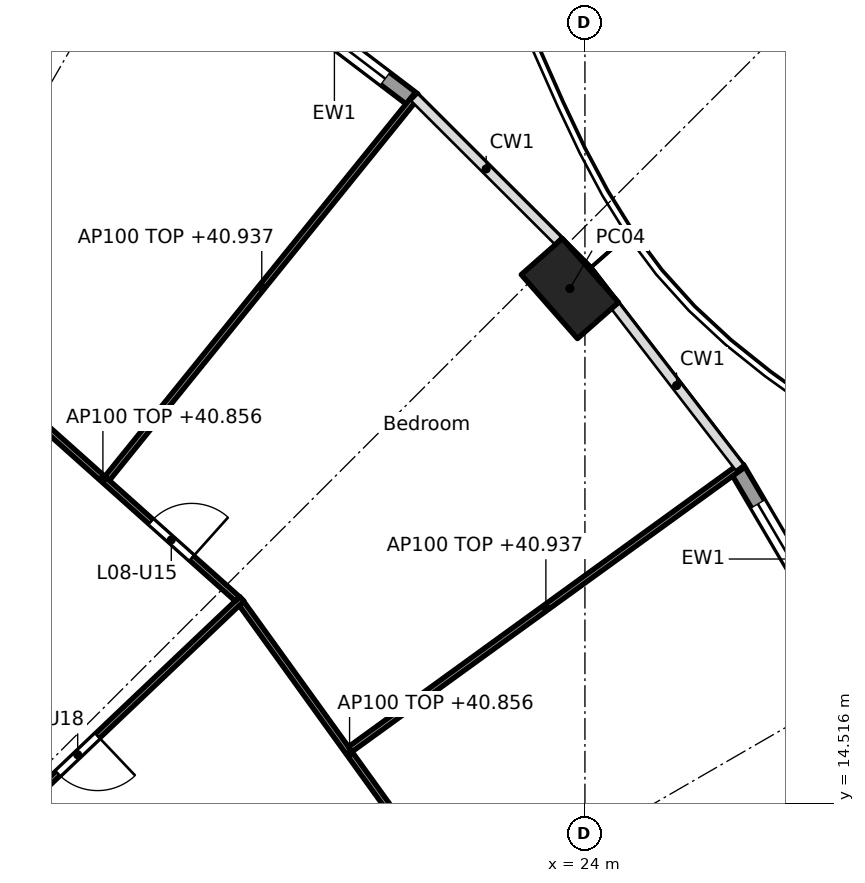
"""IFC4 building model, lengths in metres.
Left out: names, types, materials, properties, quantities, classifications, styles, units other than length and angle.
Written with IfcOpenShell. Run it as: python <this file> out.ifc"""

import sys

from ifc_helpers import new_model, si_unit, direction, frame, frame_2d, origin, origin_2d, place, context, subcontext, project, spatial, rectangle, hollow_rectangle, extrude, element, fill, save


model = new_model("IFC4")
c1 = context("Model", 3, precision=1e-05, world=origin(), true_north=direction((0.0, 1.0)))
c2 = subcontext(c1, "Body", "Model", "MODEL_VIEW")
j1 = project(units=[si_unit("LENGTHUNIT", "METRE"), si_unit("PLANEANGLEUNIT", "RADIAN")], contexts=[c1])
p1 = place(None, origin())
s1 = spatial("IfcSite", under=j1, at=p1, CompositionType="ELEMENT")
p2 = place(p1, origin())
s2 = spatial("IfcBuilding", under=s1, at=p2, CompositionType="ELEMENT")
p3 = place(p2, frame((0.0, 0.0, 38.1)))
s3 = spatial("IfcBuildingStorey", under=s2, at=p3, CompositionType="ELEMENT", Elevation=38.1)
p4 = place(p3, frame((23.752, 22.981, 0.0), z_axis=(0.0, 0.0, 1.0), x_axis=(-0.660114607735, 0.751164898445, 0.0)))
e1 = element("IfcColumn", 1, at=p4, inside=s3, PredefinedType="COLUMN", context=c2, shape_type="SweptSolid", body=[
    extrude(hollow_rectangle(XDim=1.4, YDim=0.9, WallThickness=0.05, at=origin_2d()), origin(), (0.0, 0.0, 1.0), 3.7),
])
p5 = place(p3, frame((26.5, 20.026, 0.0), z_axis=(0.0, 0.0, 1.0), x_axis=(0.506311160839, -0.862350861546, 0.0)))
e2 = element("IfcWall", 2, at=p5, inside=s3, PredefinedType="SOLIDWALL", context=c2, shape_type="SweptSolid", body=[
    extrude(rectangle(XDim=3.462, YDim=0.25, at=frame_2d((1.731, 0.0))), origin(), (0.0, 0.0, 1.0), 3.44),
])
p6 = place(p5, frame((0.681, 0.0, 0.0)))
e3 = element("IfcOpeningElement", 3, at=p6, cuts=e2, PredefinedType="OPENING", context=c2, shape_type="SweptSolid", body=[
    extrude(rectangle(XDim=2.1, YDim=2.4, at=frame_2d((1.05, 1.2))), frame((0.0, 0.135, 0.0), z_axis=(0.0, -1.0, 0.0), x_axis=(1.0, 0.0, 0.0)), (0.0, 0.0, 1.0), 0.27),
])
p7 = place(p3, frame((18.582, 28.056, 0.0), z_axis=(0.0, 0.0, 1.0), x_axis=(0.796022293214, -0.605267303517, 0.0)))
e4 = element("IfcWall", 4, at=p7, inside=s3, PredefinedType="SOLIDWALL", context=c2, shape_type="SweptSolid", body=[
    extrude(rectangle(XDim=3.262, YDim=0.25, at=frame_2d((1.631, 0.0))), origin(), (0.0, 0.0, 1.0), 3.44),
])
p8 = place(p7, frame((0.581, 0.0, 0.0)))
e5 = element("IfcOpeningElement", 5, at=p8, cuts=e4, PredefinedType="OPENING", context=c2, shape_type="SweptSolid", body=[
    extrude(rectangle(XDim=2.1, YDim=2.4, at=frame_2d((1.05, 1.2))), frame((0.0, 0.135, 0.0), z_axis=(0.0, -1.0, 0.0), x_axis=(1.0, 0.0, 0.0)), (0.0, 0.0, 1.0), 0.27),
])
p9 = place(p3, frame((21.908, 12.866, 0.0), z_axis=(0.0, 0.0, 1.0), x_axis=(-0.584558392935, 0.811351640936, 0.0)))
e6 = element("IfcWall", 6, at=p9, inside=s3, PredefinedType="PARTITIONING", context=c2, shape_type="SweptSolid", body=[
    extrude(rectangle(XDim=6.084, YDim=0.1, at=frame_2d((3.042, 0.0))), origin(), (0.0, 0.0, 1.0), 2.756),
])
p10 = place(p3, frame((20.141, 15.405, 0.0), z_axis=(0.0, 0.0, 1.0), x_axis=(0.809834895779, 0.58665785734, 0.0)))
e7 = element("IfcWall", 7, at=p10, inside=s3, PredefinedType="PARTITIONING", context=c2, shape_type="SweptSolid", body=[
    extrude(rectangle(XDim=7.945, YDim=0.1, at=frame_2d((3.973, 0.0))), origin(), (0.0, 0.0, 1.0), 2.837),
])
p11 = place(p3, frame((8.957, 8.953, 0.0), z_axis=(0.0, 0.0, 1.0), x_axis=(0.725250022034, 0.688485588476, 0.0)))
e8 = element("IfcWall", 8, at=p11, inside=s3, PredefinedType="PARTITIONING", context=c2, shape_type="SweptSolid", body=[
    extrude(rectangle(XDim=12.963, YDim=0.1, at=frame_2d((6.481, 0.0))), origin(), (0.0, 0.0, 1.0), 2.687),
])
p12 = place(p11, frame((8.79, 0.0, 0.0)))
e9 = element("IfcOpeningElement", 9, at=p12, cuts=e8, PredefinedType="OPENING", context=c2, shape_type="SweptSolid", body=[
    extrude(rectangle(XDim=0.9, YDim=2.1, at=frame_2d((0.45, 1.05))), frame((0.0, 0.06, 0.0), z_axis=(0.0, -1.0, 0.0), x_axis=(1.0, 0.0, 0.0)), (0.0, 0.0, 1.0), 0.12),
])
p13 = place(p3, frame((18.285, 17.877, 0.0), z_axis=(0.0, 0.0, 1.0), x_axis=(-0.745812746724, 0.666155647596, 0.0)))
e10 = element("IfcWall", 10, at=p13, inside=s3, PredefinedType="PARTITIONING", context=c2, shape_type="SweptSolid", body=[
    extrude(rectangle(XDim=5.931, YDim=0.1, at=frame_2d((2.965, 0.0))), origin(), (0.0, 0.0, 1.0), 2.756),
])
p14 = place(p13, frame((1.008, 0.0, 0.0)))
e11 = element("IfcOpeningElement", 11, at=p14, cuts=e10, PredefinedType="OPENING", context=c2, shape_type="SweptSolid", body=[
    extrude(rectangle(XDim=0.9, YDim=2.1, at=frame_2d((0.45, 1.05))), frame((0.0, 0.06, 0.0), z_axis=(0.0, -1.0, 0.0), x_axis=(1.0, 0.0, 0.0)), (0.0, 0.0, 1.0), 0.12),
])
p15 = place(p3, frame((16.142, 19.858, 0.0), z_axis=(0.0, 0.0, 1.0), x_axis=(0.628738066508, 0.777617157555, 0.0)))
e12 = element("IfcWall", 12, at=p15, inside=s3, PredefinedType="PARTITIONING", context=c2, shape_type="SweptSolid", body=[
    extrude(rectangle(XDim=8.091, YDim=0.1, at=frame_2d((4.045, 0.0))), origin(), (0.0, 0.0, 1.0), 2.837),
])
p16 = place(p6, origin())
e13 = element("IfcDoor", 13, at=p16, inside=s3, OperationType="SLIDING_TO_LEFT", PredefinedType="DOOR", context=c2, shape_type="SweptSolid", body=[
    extrude(rectangle(XDim=2.1, YDim=2.4, at=frame_2d((1.05, 1.2))), frame((0.0, 0.025, 0.0), z_axis=(0.0, -1.0, 0.0), x_axis=(1.0, 0.0, 0.0)), (0.0, 0.0, 1.0), 0.05),
])
fill(e3, e13)
p17 = place(p8, origin())
e14 = element("IfcDoor", 14, at=p17, inside=s3, OperationType="SLIDING_TO_LEFT", PredefinedType="DOOR", context=c2, shape_type="SweptSolid", body=[
    extrude(rectangle(XDim=2.1, YDim=2.4, at=frame_2d((1.05, 1.2))), frame((0.0, 0.025, 0.0), z_axis=(0.0, -1.0, 0.0), x_axis=(1.0, 0.0, 0.0)), (0.0, 0.0, 1.0), 0.05),
])
fill(e5, e14)
p18 = place(p14, frame((0.9, 0.0, 0.0), x_axis=(-1.0, 0.0, 0.0)))
e15 = element("IfcDoor", 15, at=p18, inside=s3, OperationType="SINGLE_SWING_RIGHT", PredefinedType="DOOR", context=c2, shape_type="SweptSolid", body=[
    extrude(rectangle(XDim=0.9, YDim=2.1, at=frame_2d((0.45, 1.05))), frame((0.0, 0.025, 0.0), z_axis=(0.0, -1.0, 0.0), x_axis=(1.0, 0.0, 0.0)), (0.0, 0.0, 1.0), 0.05),
])
fill(e11, e15)
p19 = place(p12, frame((0.9, 0.0, 0.0), x_axis=(-1.0, 0.0, 0.0)))
e16 = element("IfcDoor", 16, at=p19, inside=s3, OperationType="SINGLE_SWING_LEFT", PredefinedType="DOOR", context=c2, shape_type="SweptSolid", body=[
    extrude(rectangle(XDim=0.9, YDim=2.1, at=frame_2d((0.45, 1.05))), frame((0.0, 0.025, 0.0), z_axis=(0.0, -1.0, 0.0), x_axis=(1.0, 0.0, 0.0)), (0.0, 0.0, 1.0), 0.05),
])
fill(e9, e16)
save(model, sys.argv[1])
